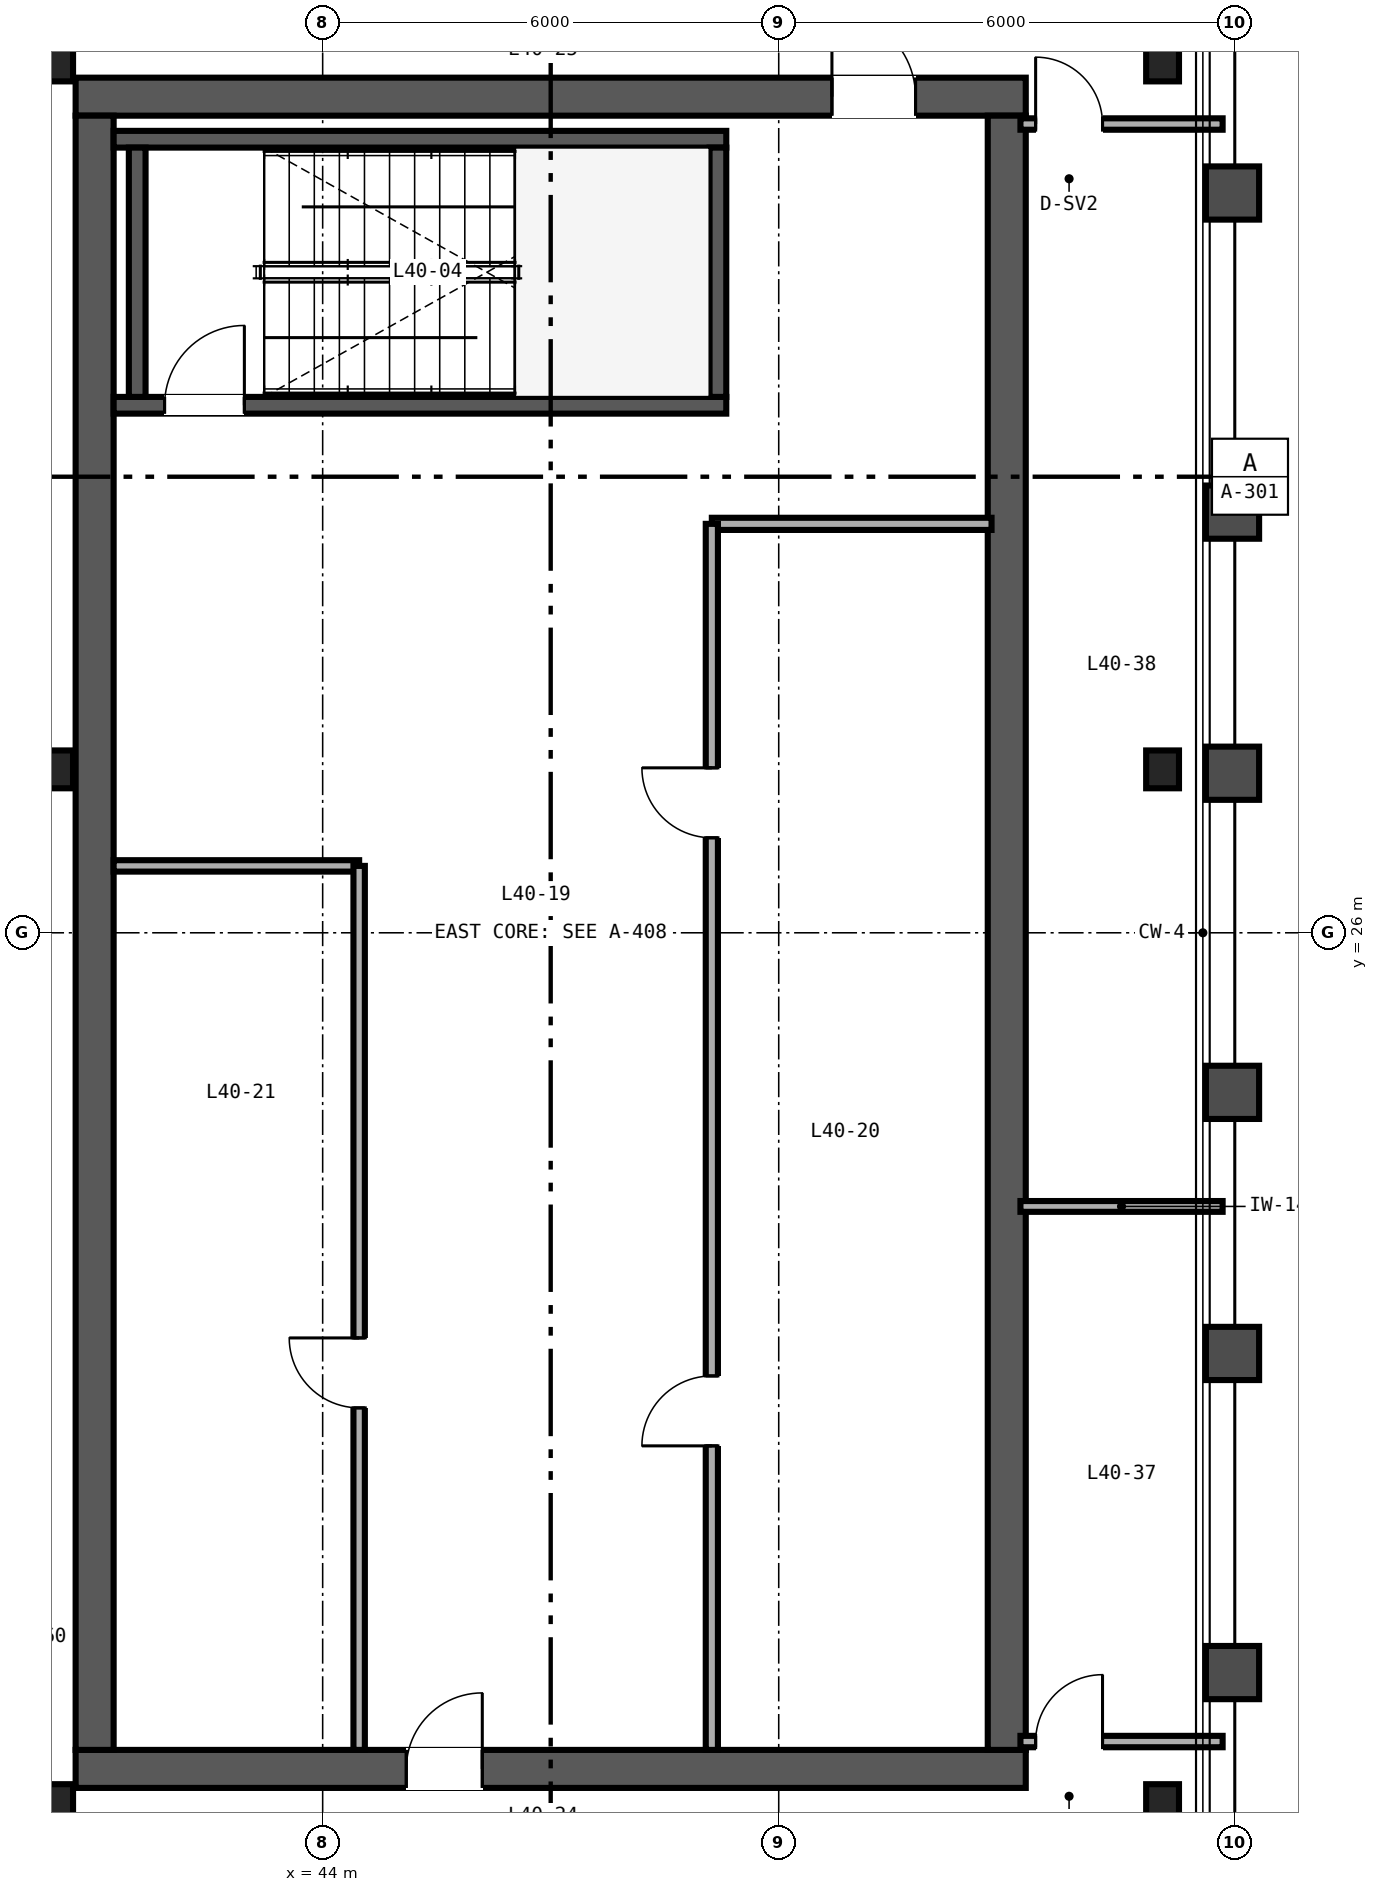
"""IFC4 building model, lengths in metres.
Left out: names, types, materials, properties, quantities, classifications, styles, units other than length and angle.
Written with IfcOpenShell. Run it as: python <this file> out.ifc"""

import sys

from ifc_helpers import new_model, si_unit, direction, frame, frame_2d, origin, origin_2d, place, context, subcontext, project, spatial, rectangle, i_section, extrude, source, transform, mapped, element, fill, save


model = new_model("IFC4")
c1 = context("Model", 3, precision=1e-05, world=origin(), true_north=direction((0.0, 1.0)))
c2 = subcontext(c1, "Body", "Model", "MODEL_VIEW")
j1 = project(units=[si_unit("LENGTHUNIT", "METRE"), si_unit("PLANEANGLEUNIT", "RADIAN")], contexts=[c1])
p1 = place(None, origin())
s1 = spatial("IfcSite", under=j1, at=p1, CompositionType="ELEMENT")
p2 = place(p1, origin())
s2 = spatial("IfcBuilding", under=s1, at=p2, CompositionType="ELEMENT")
p3 = place(p2, frame((0.0, 0.0, 163.2)))
s3 = spatial("IfcBuildingStorey", under=s2, at=p3, CompositionType="ELEMENT", Elevation=163.2)
p4 = place(p3, frame((40.75, 15.0, 0.0), z_axis=(0.0, 0.0, 1.0), x_axis=(1.0, 0.0, 0.0)))
e1 = element("IfcWall", 1, at=p4, inside=s3, PredefinedType="SHEAR", context=c2, shape_type="SweptSolid", body=[
    extrude(rectangle(XDim=12.5, YDim=0.5, at=frame_2d((6.25, 0.0))), origin(), (0.0, 0.0, 1.0), 3.37),
])
p5 = place(p4, frame((4.35, 0.0, 0.0)))
e2 = element("IfcOpeningElement", 2, at=p5, cuts=e1, PredefinedType="OPENING", context=c2, shape_type="SweptSolid", body=[
    extrude(rectangle(XDim=1.0, YDim=2.15, at=frame_2d((0.5, 1.075))), frame((0.0, 0.26, 0.0), z_axis=(0.0, -1.0, 0.0), x_axis=(1.0, 0.0, 0.0)), (0.0, 0.0, 1.0), 0.52),
])
p6 = place(p3, frame((40.75, 37.0, 0.0), z_axis=(0.0, 0.0, 1.0), x_axis=(1.0, 0.0, 0.0)))
e3 = element("IfcWall", 3, at=p6, inside=s3, PredefinedType="SHEAR", context=c2, shape_type="SweptSolid", body=[
    extrude(rectangle(XDim=12.5, YDim=0.5, at=frame_2d((6.25, 0.0))), origin(), (0.0, 0.0, 1.0), 3.37),
])
p7 = place(p6, frame((9.95, 0.0, 0.0)))
e4 = element("IfcOpeningElement", 4, at=p7, cuts=e3, PredefinedType="OPENING", context=c2, shape_type="SweptSolid", body=[
    extrude(rectangle(XDim=1.1, YDim=2.15, at=frame_2d((0.55, 1.075))), frame((0.0, 0.26, 0.0), z_axis=(0.0, -1.0, 0.0), x_axis=(1.0, 0.0, 0.0)), (0.0, 0.0, 1.0), 0.52),
])
for number, where, z_axis, x_axis in (
    (5, (41.0, 15.25, 0.0), (0.0, 0.0, 1.0), (0.0, 1.0, 0.0)),
    (6, (53.0, 15.25, 0.0), (0.0, 0.0, 1.0), (0.0, 1.0, 0.0)),
):
    element("IfcWall", number, at=place(p3, frame(where, z_axis=z_axis, x_axis=x_axis)), inside=s3, PredefinedType="SHEAR", context=c2, shape_type="SweptSolid", body=[
        extrude(rectangle(XDim=21.5, YDim=0.5, at=frame_2d((10.75, 0.0))), origin(), (0.0, 0.0, 1.0), 3.37),
    ])
p8 = place(p3, frame((41.25, 32.94, 0.0), z_axis=(0.0, 0.0, 1.0), x_axis=(1.0, 0.0, 0.0)))
e7 = element("IfcWall", 7, at=p8, inside=s3, PredefinedType="SHEAR", context=c2, shape_type="SweptSolid", body=[
    extrude(rectangle(XDim=8.06, YDim=0.22, at=frame_2d((4.03, 0.0))), origin(), (0.0, 0.0, 1.0), 3.4),
])
p9 = place(p8, frame((0.67, 0.0, 0.0)))
e8 = element("IfcOpeningElement", 8, at=p9, cuts=e7, PredefinedType="OPENING", context=c2, shape_type="SweptSolid", body=[
    extrude(rectangle(XDim=1.05, YDim=2.15, at=frame_2d((0.525, 1.075))), frame((0.0, 0.12, 0.0), z_axis=(0.0, -1.0, 0.0), x_axis=(1.0, 0.0, 0.0)), (0.0, 0.0, 1.0), 0.24),
])
p10 = place(p3, frame((41.25, 36.44, 0.0), z_axis=(0.0, 0.0, 1.0), x_axis=(1.0, 0.0, 0.0)))
e9 = element("IfcWall", 9, at=p10, inside=s3, PredefinedType="SHEAR", context=c2, shape_type="SweptSolid", body=[
    extrude(rectangle(XDim=8.06, YDim=0.22, at=frame_2d((4.03, 0.0))), origin(), (0.0, 0.0, 1.0), 3.4),
])
for number, where, z_axis, x_axis in (
    (10, (41.56, 33.05, 0.0), (0.0, 0.0, 1.0), (0.0, 1.0, 0.0)),
    (11, (49.2, 33.05, 0.0), (0.0, 0.0, 1.0), (0.0, 1.0, 0.0)),
):
    element("IfcWall", number, at=place(p3, frame(where, z_axis=z_axis, x_axis=x_axis)), inside=s3, PredefinedType="SHEAR", context=c2, shape_type="SweptSolid", body=[
        extrude(rectangle(XDim=3.28, YDim=0.22, at=frame_2d((1.64, 0.0))), origin(), (0.0, 0.0, 1.0), 3.4),
    ])
m1 = source(origin(), c2, "Body", "SweptSolid", [
    extrude(i_section(OverallWidth=0.432, OverallDepth=0.498, WebThickness=0.056, FlangeThickness=0.089, FilletRadius=0.025, at=origin_2d()), origin(), (0.0, 0.0, 1.0), 3.37),
])
for number, where, z_axis, x_axis in (
    (12, (40.5, 14.55, 0.0), (0.0, 0.0, 1.0), (1.0, 0.0, 0.0)),
    (13, (55.05, 14.55, 0.0), (0.0, 0.0, 1.0), (1.0, 0.0, 0.0)),
    (14, (40.5, 28.15, 0.0), (0.0, 0.0, 1.0), (1.0, 0.0, 0.0)),
    (15, (55.05, 28.15, 0.0), (0.0, 0.0, 1.0), (1.0, 0.0, 0.0)),
    (16, (40.5, 37.45, 0.0), (0.0, 0.0, 1.0), (1.0, 0.0, 0.0)),
    (17, (55.05, 37.45, 0.0), (0.0, 0.0, 1.0), (1.0, 0.0, 0.0)),
):
    element("IfcColumn", number, at=place(p3, frame(where, z_axis=z_axis, x_axis=x_axis)), inside=s3, PredefinedType="COLUMN", context=c2, shape_type="MappedRepresentation", body=[
        mapped(m1, transform((0.0, 0.0, 0.0), scale=1.0)),
    ])
p11 = place(p3, frame((49.12, 31.38, 0.0), z_axis=(0.0, 0.0, 1.0), x_axis=(1.0, 0.0, 0.0)))
e18 = element("IfcWall", 18, at=p11, inside=s3, PredefinedType="PARTITIONING", context=c2, shape_type="SweptSolid", body=[
    extrude(rectangle(XDim=3.68, YDim=0.16, at=frame_2d((1.84, 0.0))), origin(), (0.0, 0.0, 1.0), 2.47),
])
p12 = place(p3, frame((49.12, 15.25, 0.0), z_axis=(0.0, 0.0, 1.0), x_axis=(0.0, 1.0, 0.0)))
e19 = element("IfcWall", 19, at=p12, inside=s3, PredefinedType="PARTITIONING", context=c2, shape_type="SweptSolid", body=[
    extrude(rectangle(XDim=16.13, YDim=0.16, at=frame_2d((8.065, 0.0))), origin(), (0.0, 0.0, 1.0), 2.443),
])
p13 = place(p12, frame((4.0, 0.0, 0.0)))
e20 = element("IfcOpeningElement", 20, at=p13, cuts=e19, PredefinedType="OPENING", context=c2, shape_type="SweptSolid", body=[
    extrude(rectangle(XDim=0.92, YDim=2.15, at=frame_2d((0.46, 1.075))), frame((0.0, 0.09, 0.0), z_axis=(0.0, -1.0, 0.0), x_axis=(1.0, 0.0, 0.0)), (0.0, 0.0, 1.0), 0.18),
])
p14 = place(p12, frame((12.0, 0.0, 0.0)))
e21 = element("IfcOpeningElement", 21, at=p14, cuts=e19, PredefinedType="OPENING", context=c2, shape_type="SweptSolid", body=[
    extrude(rectangle(XDim=0.92, YDim=2.15, at=frame_2d((0.46, 1.075))), frame((0.0, 0.09, 0.0), z_axis=(0.0, -1.0, 0.0), x_axis=(1.0, 0.0, 0.0)), (0.0, 0.0, 1.0), 0.18),
])
p15 = place(p3, frame((41.25, 26.88, 0.0), z_axis=(0.0, 0.0, 1.0), x_axis=(1.0, 0.0, 0.0)))
e22 = element("IfcWall", 22, at=p15, inside=s3, PredefinedType="PARTITIONING", context=c2, shape_type="SweptSolid", body=[
    extrude(rectangle(XDim=3.23, YDim=0.15, at=frame_2d((1.615, 0.0))), origin(), (0.0, 0.0, 1.0), 3.37),
])
p16 = place(p3, frame((44.48, 15.25, 0.0), z_axis=(0.0, 0.0, 1.0), x_axis=(0.0, 1.0, 0.0)))
e23 = element("IfcWall", 23, at=p16, inside=s3, PredefinedType="PARTITIONING", context=c2, shape_type="SweptSolid", body=[
    extrude(rectangle(XDim=11.63, YDim=0.15, at=frame_2d((5.815, 0.0))), origin(), (0.0, 0.0, 1.0), 3.37),
])
p17 = place(p16, frame((4.5, 0.0, 0.0)))
e24 = element("IfcOpeningElement", 24, at=p17, cuts=e23, PredefinedType="OPENING", context=c2, shape_type="SweptSolid", body=[
    extrude(rectangle(XDim=0.92, YDim=2.15, at=frame_2d((0.46, 1.075))), frame((0.0, 0.085, 0.0), z_axis=(0.0, -1.0, 0.0), x_axis=(1.0, 0.0, 0.0)), (0.0, 0.0, 1.0), 0.17),
])
p18 = place(p3, frame((53.18, 15.36, 0.0), z_axis=(0.0, 0.0, 1.0), x_axis=(1.0, 0.0, 0.0)))
e25 = element("IfcWall", 25, at=p18, inside=s3, PredefinedType="PARTITIONING", context=c2, shape_type="SweptSolid", body=[
    extrude(rectangle(XDim=2.66, YDim=0.15, at=frame_2d((1.33, 0.0))), origin(), (0.0, 0.0, 1.0), 2.591),
])
p19 = place(p18, frame((0.2, 0.0, 0.0)))
e26 = element("IfcOpeningElement", 26, at=p19, cuts=e25, PredefinedType="OPENING", context=c2, shape_type="SweptSolid", body=[
    extrude(rectangle(XDim=0.88, YDim=2.15, at=frame_2d((0.44, 1.075))), frame((0.0, 0.085, 0.0), z_axis=(0.0, -1.0, 0.0), x_axis=(1.0, 0.0, 0.0)), (0.0, 0.0, 1.0), 0.17),
])
p20 = place(p3, frame((53.18, 36.64, 0.0), z_axis=(0.0, 0.0, 1.0), x_axis=(1.0, 0.0, 0.0)))
e27 = element("IfcWall", 27, at=p20, inside=s3, PredefinedType="PARTITIONING", context=c2, shape_type="SweptSolid", body=[
    extrude(rectangle(XDim=2.66, YDim=0.15, at=frame_2d((1.33, 0.0))), origin(), (0.0, 0.0, 1.0), 2.753),
])
p21 = place(p20, frame((0.2, 0.0, 0.0)))
e28 = element("IfcOpeningElement", 28, at=p21, cuts=e27, PredefinedType="OPENING", context=c2, shape_type="SweptSolid", body=[
    extrude(rectangle(XDim=0.88, YDim=2.15, at=frame_2d((0.44, 1.075))), frame((0.0, 0.085, 0.0), z_axis=(0.0, -1.0, 0.0), x_axis=(1.0, 0.0, 0.0)), (0.0, 0.0, 1.0), 0.17),
])
p22 = place(p3, frame((53.18, 22.4, 0.0), z_axis=(0.0, 0.0, 1.0), x_axis=(1.0, 0.0, 0.0)))
e29 = element("IfcWall", 29, at=p22, inside=s3, PredefinedType="PARTITIONING", context=c2, shape_type="SweptSolid", body=[
    extrude(rectangle(XDim=2.66, YDim=0.142, at=frame_2d((1.33, 0.0))), origin(), (0.0, 0.0, 1.0), 2.591),
])
m2 = source(origin(), c2, "Body", "SweptSolid", [
    extrude(rectangle(XDim=1.05, YDim=2.15, at=frame_2d((0.525, 1.075))), frame((0.0, 0.025, 0.0), z_axis=(0.0, -1.0, 0.0), x_axis=(1.0, 0.0, 0.0)), (0.0, 0.0, 1.0), 0.05),
])
p23 = place(p9, origin())
e30 = element("IfcDoor", 30, at=p23, inside=s3, OperationType="SINGLE_SWING_RIGHT", PredefinedType="DOOR", context=c2, shape_type="MappedRepresentation", body=[
    mapped(m2, transform((0.0, 0.0, 0.0), scale=1.0)),
])
fill(e8, e30)
m3 = source(origin(), c2, "Body", "SweptSolid", [
    extrude(rectangle(XDim=1.0, YDim=2.15, at=frame_2d((0.5, 1.075))), frame((0.0, 0.025, 0.0), z_axis=(0.0, -1.0, 0.0), x_axis=(1.0, 0.0, 0.0)), (0.0, 0.0, 1.0), 0.05),
])
p24 = place(p5, origin())
e31 = element("IfcDoor", 31, at=p24, inside=s3, OperationType="SINGLE_SWING_RIGHT", PredefinedType="DOOR", context=c2, shape_type="MappedRepresentation", body=[
    mapped(m3, transform((0.0, 0.0, 0.0), scale=1.0)),
])
fill(e2, e31)
m4 = source(origin(), c2, "Body", "SweptSolid", [
    extrude(rectangle(XDim=1.1, YDim=2.15, at=frame_2d((0.55, 1.075))), frame((0.0, 0.025, 0.0), z_axis=(0.0, -1.0, 0.0), x_axis=(1.0, 0.0, 0.0)), (0.0, 0.0, 1.0), 0.05),
])
p25 = place(p7, origin())
e32 = element("IfcDoor", 32, at=p25, inside=s3, OperationType="SINGLE_SWING_LEFT", PredefinedType="DOOR", context=c2, shape_type="MappedRepresentation", body=[
    mapped(m4, transform((0.0, 0.0, 0.0), scale=1.0)),
])
fill(e4, e32)
m5 = source(origin(), c2, "Body", "SweptSolid", [
    extrude(rectangle(XDim=0.92, YDim=2.15, at=frame_2d((0.46, 1.075))), frame((0.0, 0.025, 0.0), z_axis=(0.0, -1.0, 0.0), x_axis=(1.0, 0.0, 0.0)), (0.0, 0.0, 1.0), 0.05),
])
p26 = place(p13, origin())
e33 = element("IfcDoor", 33, at=p26, inside=s3, OperationType="SINGLE_SWING_LEFT", PredefinedType="DOOR", context=c2, shape_type="MappedRepresentation", body=[
    mapped(m5, transform((0.0, 0.0, 0.0), scale=1.0)),
])
fill(e20, e33)
p27 = place(p14, origin())
e34 = element("IfcDoor", 34, at=p27, inside=s3, OperationType="SINGLE_SWING_RIGHT", PredefinedType="DOOR", context=c2, shape_type="MappedRepresentation", body=[
    mapped(m5, transform((0.0, 0.0, 0.0), scale=1.0)),
])
fill(e21, e34)
p28 = place(p17, origin())
e35 = element("IfcDoor", 35, at=p28, inside=s3, OperationType="SINGLE_SWING_RIGHT", PredefinedType="DOOR", context=c2, shape_type="MappedRepresentation", body=[
    mapped(m5, transform((0.0, 0.0, 0.0), scale=1.0)),
])
fill(e24, e35)
m6 = source(origin(), c2, "Body", "SweptSolid", [
    extrude(rectangle(XDim=0.88, YDim=2.15, at=frame_2d((0.44, 1.075))), frame((0.0, 0.025, 0.0), z_axis=(0.0, -1.0, 0.0), x_axis=(1.0, 0.0, 0.0)), (0.0, 0.0, 1.0), 0.05),
])
p29 = place(p19, origin())
e36 = element("IfcDoor", 36, at=p29, inside=s3, OperationType="SINGLE_SWING_RIGHT", PredefinedType="DOOR", context=c2, shape_type="MappedRepresentation", body=[
    mapped(m6, transform((0.0, 0.0, 0.0), scale=1.0)),
])
fill(e26, e36)
p30 = place(p21, origin())
e37 = element("IfcDoor", 37, at=p30, inside=s3, OperationType="SINGLE_SWING_LEFT", PredefinedType="DOOR", context=c2, shape_type="MappedRepresentation", body=[
    mapped(m6, transform((0.0, 0.0, 0.0), scale=1.0)),
])
fill(e28, e37)
save(model, sys.argv[1])
